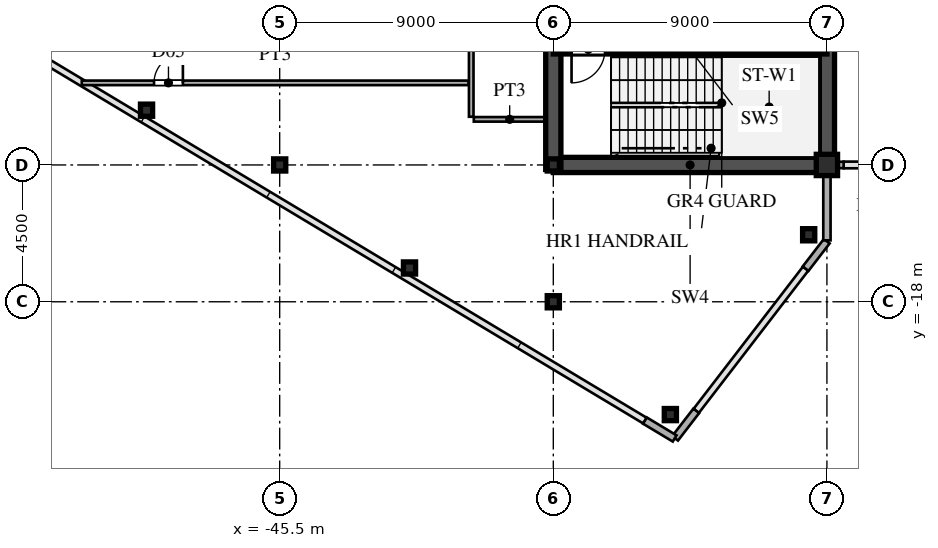
"""IFC4 building model, lengths in metres.
Left out: names, types, materials, properties, quantities, classifications, styles, units other than length and angle.
Written with IfcOpenShell. Run it as: python <this file> out.ifc"""

import sys

from ifc_helpers import new_model, si_unit, direction, frame, frame_2d, origin, origin_2d, place, context, subcontext, project, spatial, rectangle, hollow_rectangle, i_section, extrude, source, transform, mapped, element, fill, save


model = new_model("IFC4")
c1 = context("Model", 3, precision=1e-05, world=origin(), true_north=direction((0.0, 1.0)))
c2 = subcontext(c1, "Body", "Model", "MODEL_VIEW")
j1 = project(units=[si_unit("LENGTHUNIT", "METRE"), si_unit("PLANEANGLEUNIT", "RADIAN")], contexts=[c1])
p1 = place(None, origin())
s1 = spatial("IfcSite", under=j1, at=p1, CompositionType="ELEMENT")
p2 = place(p1, origin())
s2 = spatial("IfcBuilding", under=s1, at=p2, CompositionType="ELEMENT")
p3 = place(p2, frame((0.0, 0.0, 274.2)))
s3 = spatial("IfcBuildingStorey", under=s2, at=p3, CompositionType="ELEMENT", Elevation=274.2)
m1 = source(origin(), c2, "Body", "SweptSolid", [
    extrude(hollow_rectangle(XDim=0.7, YDim=0.7, WallThickness=0.03, at=origin_2d()), origin(), (0.0, 0.0, 1.0), 4.8),
])
p4 = place(p3, frame((-27.5, -13.5, 0.0), z_axis=(0.0, 0.0, 1.0), x_axis=(1.0, 0.0, 0.0)))
e1 = element("IfcColumn", 1, at=p4, inside=s3, PredefinedType="COLUMN", context=c2, shape_type="MappedRepresentation", body=[
    mapped(m1, transform((0.0, 0.0, 0.0), scale=1.0)),
])
m2 = source(origin(), c2, "Body", "SweptSolid", [
    extrude(i_section(OverallWidth=0.4, OverallDepth=0.4, WebThickness=0.013, FlangeThickness=0.021, at=origin_2d()), origin(), (0.0, 0.0, 1.0), 4.8),
])
for number, where, z_axis, x_axis in (
    (2, (-36.5, -18.0, 0.0), (0.0, 0.0, 1.0), (1.0, 0.0, 0.0)),
    (3, (-36.5, -13.5, 0.0), (0.0, 0.0, 1.0), (1.0, 0.0, 0.0)),
    (4, (-45.5, -13.5, 0.0), (0.0, 0.0, 1.0), (1.0, 0.0, 0.0)),
):
    element("IfcColumn", number, at=place(p3, frame(where, z_axis=z_axis, x_axis=x_axis)), inside=s3, PredefinedType="COLUMN", context=c2, shape_type="MappedRepresentation", body=[
        mapped(m2, transform((0.0, 0.0, 0.0), scale=1.0)),
    ])
m3 = source(origin(), c2, "Body", "SweptSolid", [
    extrude(hollow_rectangle(XDim=0.4, YDim=0.4, WallThickness=0.016, at=origin_2d()), origin(), (0.0, 0.0, 1.0), 4.8),
])
for number, where, z_axis, x_axis in (
    (5, (-28.1, -15.796, 0.0), (0.0, 0.0, 1.0), (1.0, 0.0, 0.0)),
    (6, (-32.65, -21.71, 0.0), (0.0, 0.0, 1.0), (1.0, 0.0, 0.0)),
    (7, (-41.23, -16.889, 0.0), (0.0, 0.0, 1.0), (1.0, 0.0, 0.0)),
    (8, (-49.88, -11.699, 0.0), (0.0, 0.0, 1.0), (1.0, 0.0, 0.0)),
):
    element("IfcColumn", number, at=place(p3, frame(where, z_axis=z_axis, x_axis=x_axis)), inside=s3, PredefinedType="COLUMN", context=c2, shape_type="MappedRepresentation", body=[
        mapped(m3, transform((0.0, 0.0, 0.0), scale=1.0)),
    ])
p5 = place(p3, frame((-27.5, -15.98, 0.0), z_axis=(0.0, 0.0, 1.0), x_axis=(0.0, 1.0, 0.0)))
e9 = element("IfcWall", 9, at=p5, inside=s3, PredefinedType="SOLIDWALL", context=c2, shape_type="SweptSolid", body=[
    extrude(rectangle(XDim=1.605, YDim=0.24, at=frame_2d((0.803, 0.0))), origin(), (0.0, 0.0, 1.0), 4.52),
])
p6 = place(p3, frame((-27.5, -14.375, 0.0), z_axis=(0.0, 0.0, 1.0), x_axis=(0.0, 1.0, 0.0)))
e10 = element("IfcWall", 10, at=p6, inside=s3, PredefinedType="SOLIDWALL", context=c2, shape_type="SweptSolid", body=[
    extrude(rectangle(XDim=0.62, YDim=0.24, at=frame_2d((0.31, 0.0))), origin(), (0.0, 0.0, 1.0), 4.02),
])
for number, where, z_axis, x_axis in (
    (11, (-33.486, -21.908, 0.0), (0.0, 0.0, 1.0), (0.857, -0.515, 0.0)),
    (12, (-32.494, -22.492, 0.0), (0.0, 0.0, 1.0), (0.61, 0.793, 0.0)),
    (13, (-28.201, -16.912, 0.0), (0.0, 0.0, 1.0), (0.61, 0.793, 0.0)),
):
    element("IfcWall", number, at=place(p3, frame(where, z_axis=z_axis, x_axis=x_axis)), inside=s3, PredefinedType="SOLIDWALL", context=c2, shape_type="SweptSolid", body=[
        extrude(rectangle(XDim=1.14, YDim=0.24, at=frame_2d((0.57, 0.0))), origin(), (0.0, 0.0, 1.0), 4.52),
    ])
p7 = place(p3, frame((-27.49, -13.5, 0.0), z_axis=(0.0, 0.0, 1.0), x_axis=(1.0, 0.0, 0.0)))
e14 = element("IfcWall", 14, at=p7, inside=s3, PredefinedType="SOLIDWALL", context=c2, shape_type="SweptSolid", body=[
    extrude(rectangle(XDim=0.54, YDim=0.21, at=frame_2d((0.27, 0.0))), origin(), (0.0, 0.0, 1.0), 4.02),
])
p8 = place(p3, frame((-27.5, -13.5, 0.0), z_axis=(0.0, 0.0, 1.0), x_axis=(0.0, 1.0, 0.0)))
e15 = element("IfcWall", 15, at=p8, inside=s3, PredefinedType="SHEAR", context=c2, shape_type="SweptSolid", body=[
    extrude(rectangle(XDim=12.2, YDim=0.5, at=frame_2d((6.1, 0.0))), origin(), (0.0, 0.0, 1.0), 4.52),
])
p9 = place(p3, frame((-36.5, -13.5, 0.0), z_axis=(0.0, 0.0, 1.0), x_axis=(1.0, 0.0, 0.0)))
e16 = element("IfcWall", 16, at=p9, inside=s3, PredefinedType="SHEAR", context=c2, shape_type="SweptSolid", body=[
    extrude(rectangle(XDim=9.0, YDim=0.5, at=frame_2d((4.5, 0.0))), origin(), (0.0, 0.0, 1.0), 4.52),
])
p10 = place(p3, frame((-36.5, -13.65, 0.0), z_axis=(0.0, 0.0, 1.0), x_axis=(0.0, 1.0, 0.0)))
e17 = element("IfcWall", 17, at=p10, inside=s3, PredefinedType="SHEAR", context=c2, shape_type="SweptSolid", body=[
    extrude(rectangle(XDim=7.15, YDim=0.5, at=frame_2d((3.575, 0.0))), origin(), (0.0, 0.0, 1.0), 4.52),
])
p11 = place(p10, frame((4.675, 0.0, 0.0)))
e18 = element("IfcOpeningElement", 18, at=p11, cuts=e17, PredefinedType="OPENING", context=c2, shape_type="SweptSolid", body=[
    extrude(rectangle(XDim=1.15, YDim=2.2, at=frame_2d((0.575, 1.1))), frame((0.0, 0.26, 0.0), z_axis=(0.0, -1.0, 0.0), x_axis=(1.0, 0.0, 0.0)), (0.0, 0.0, 1.0), 0.52),
])
p12 = place(p3, frame((-36.5, -9.7, 0.0), z_axis=(0.0, 0.0, 1.0), x_axis=(1.0, 0.0, 0.0)))
e19 = element("IfcWall", 19, at=p12, inside=s3, PredefinedType="SHEAR", context=c2, shape_type="SweptSolid", body=[
    extrude(rectangle(XDim=9.0, YDim=0.3, at=frame_2d((4.5, 0.0))), origin(), (0.0, 0.0, 1.0), 4.52),
])
p13 = place(p12, frame((0.6, 0.0, 0.0)))
e20 = element("IfcOpeningElement", 20, at=p13, cuts=e19, PredefinedType="OPENING", context=c2, shape_type="SweptSolid", body=[
    extrude(rectangle(XDim=1.1, YDim=2.2, at=frame_2d((0.55, 1.1))), frame((0.0, 0.16, 0.0), z_axis=(0.0, -1.0, 0.0), x_axis=(1.0, 0.0, 0.0)), (0.0, 0.0, 1.0), 0.32),
])
p14 = place(p3, frame((-39.115, -12.0, 0.0), z_axis=(0.0, 0.0, 1.0), x_axis=(1.0, 0.0, 0.0)))
e21 = element("IfcWall", 21, at=p14, inside=s3, PredefinedType="PARTITIONING", context=c2, shape_type="SweptSolid", body=[
    extrude(rectangle(XDim=2.36, YDim=0.15, at=frame_2d((1.18, 0.0))), origin(), (0.0, 0.0, 1.0), 4.52),
])
p15 = place(p3, frame((-52.01, -10.8, 0.0), z_axis=(0.0, 0.0, 1.0), x_axis=(1.0, 0.0, 0.0)))
e22 = element("IfcWall", 22, at=p15, inside=s3, PredefinedType="PARTITIONING", context=c2, shape_type="SweptSolid", body=[
    extrude(rectangle(XDim=12.725, YDim=0.15, at=frame_2d((6.363, 0.0))), origin(), (0.0, 0.0, 1.0), 4.52),
])
p16 = place(p15, frame((2.376, 0.0, 0.0)))
e23 = element("IfcOpeningElement", 23, at=p16, cuts=e22, PredefinedType="OPENING", context=c2, shape_type="SweptSolid", body=[
    extrude(rectangle(XDim=0.95, YDim=2.15, at=frame_2d((0.475, 1.075))), frame((0.0, 0.085, 0.0), z_axis=(0.0, -1.0, 0.0), x_axis=(1.0, 0.0, 0.0)), (0.0, 0.0, 1.0), 0.17),
])
p17 = place(p3, frame((-39.2, -11.915, 0.0), z_axis=(0.0, 0.0, 1.0), x_axis=(0.0, 1.0, 0.0)))
e24 = element("IfcWall", 24, at=p17, inside=s3, PredefinedType="PARTITIONING", context=c2, shape_type="SweptSolid", body=[
    extrude(rectangle(XDim=23.83, YDim=0.15, at=frame_2d((11.915, 0.0))), origin(), (0.0, 0.0, 1.0), 4.52),
])
p18 = place(p17, frame((11.44, 0.0, 0.0)))
e25 = element("IfcOpeningElement", 25, at=p18, cuts=e24, PredefinedType="OPENING", context=c2, shape_type="SweptSolid", body=[
    extrude(rectangle(XDim=0.95, YDim=2.15, at=frame_2d((0.475, 1.075))), frame((0.0, 0.085, 0.0), z_axis=(0.0, -1.0, 0.0), x_axis=(1.0, 0.0, 0.0)), (0.0, 0.0, 1.0), 0.17),
])
m4 = source(origin(), c2, "Body", "SweptSolid", [
    extrude(rectangle(XDim=0.95, YDim=2.15, at=frame_2d((0.475, 1.075))), frame((0.0, 0.025, 0.0), z_axis=(0.0, -1.0, 0.0), x_axis=(1.0, 0.0, 0.0)), (0.0, 0.0, 1.0), 0.05),
])
p19 = place(p16, origin())
e26 = element("IfcDoor", 26, at=p19, inside=s3, OperationType="SINGLE_SWING_RIGHT", PredefinedType="DOOR", context=c2, shape_type="MappedRepresentation", body=[
    mapped(m4, transform((0.0, 0.0, 0.0), scale=1.0)),
])
fill(e23, e26)
save(model, sys.argv[1])
